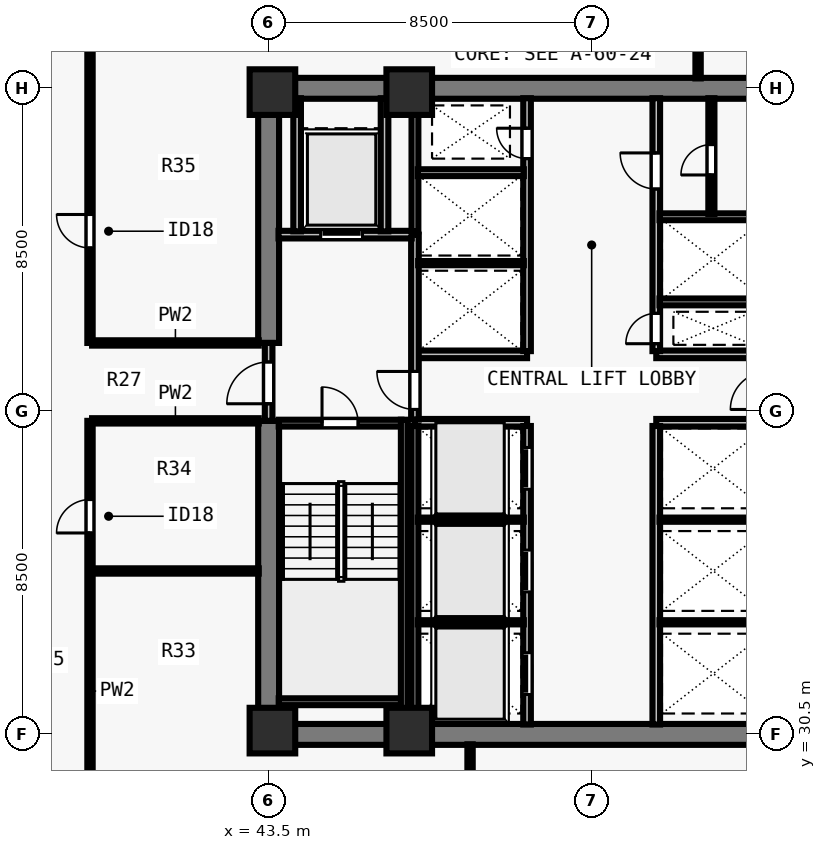
"""IFC4 building model, lengths in metres.
Left out: names, types, materials, properties, quantities, classifications, styles, units other than length and angle.
Written with IfcOpenShell. Run it as: python <this file> out.ifc"""

import sys

from ifc_helpers import new_model, si_unit, direction, frame, frame_2d, origin, origin_2d, place, context, subcontext, project, spatial, rectangle, extrude, element, fill, save


model = new_model("IFC4")
c1 = context("Model", 3, precision=1e-05, world=origin(), true_north=direction((0.0, 1.0)))
c2 = subcontext(c1, "Body", "Model", "MODEL_VIEW")
j1 = project(units=[si_unit("LENGTHUNIT", "METRE"), si_unit("PLANEANGLEUNIT", "RADIAN")], contexts=[c1])
p1 = place(None, origin())
s1 = spatial("IfcSite", under=j1, at=p1, CompositionType="ELEMENT")
p2 = place(p1, origin())
s2 = spatial("IfcBuilding", under=s1, at=p2, CompositionType="ELEMENT")
p3 = place(p2, frame((0.0, 0.0, 79.5)))
s3 = spatial("IfcBuildingStorey", under=s2, at=p3, CompositionType="ELEMENT", Elevation=79.5)
for number, where, z_axis, x_axis in (
    (1, (43.6, 30.6, 0.0), (0.0, 0.0, 1.0), (1.0, 0.0, 0.0)),
    (2, (47.2, 30.6, 0.0), (0.0, 0.0, 1.0), (1.0, 0.0, 0.0)),
    (3, (43.6, 47.4, 0.0), (0.0, 0.0, 1.0), (1.0, 0.0, 0.0)),
    (4, (47.2, 47.4, 0.0), (0.0, 0.0, 1.0), (1.0, 0.0, 0.0)),
):
    element("IfcColumn", number, at=place(p3, frame(where, z_axis=z_axis, x_axis=x_axis)), inside=s3, PredefinedType="COLUMN", context=c2, shape_type="SweptSolid", body=[
        extrude(rectangle(XDim=1.2, YDim=1.2, at=origin_2d()), origin(), (0.0, 0.0, 1.0), 3.5),
    ])
for number, where, z_axis, x_axis in (
    (5, (43.225, 30.5, 0.0), (0.0, 0.0, 1.0), (1.0, 0.0, 0.0)),
    (6, (43.225, 47.5, 0.0), (0.0, 0.0, 1.0), (1.0, 0.0, 0.0)),
):
    element("IfcWall", number, at=place(p3, frame(where, z_axis=z_axis, x_axis=x_axis)), inside=s3, PredefinedType="SHEAR", context=c2, shape_type="SweptSolid", body=[
        extrude(rectangle(XDim=17.55, YDim=0.55, at=frame_2d((8.775, 0.0))), origin(), (0.0, 0.0, 1.0), 3.28),
    ])
p4 = place(p3, frame((43.5, 30.765, 0.0), z_axis=(0.0, 0.0, 1.0), x_axis=(0.0, 1.0, 0.0)))
e7 = element("IfcWall", 7, at=p4, inside=s3, PredefinedType="SHEAR", context=c2, shape_type="SweptSolid", body=[
    extrude(rectangle(XDim=7.985, YDim=0.55, at=frame_2d((3.993, 0.0))), origin(), (0.0, 0.0, 1.0), 3.28),
])
p5 = place(p3, frame((43.5, 40.8, 0.0), z_axis=(0.0, 0.0, 1.0), x_axis=(0.0, 1.0, 0.0)))
e8 = element("IfcWall", 8, at=p5, inside=s3, PredefinedType="SHEAR", context=c2, shape_type="SweptSolid", body=[
    extrude(rectangle(XDim=6.435, YDim=0.55, at=frame_2d((3.218, 0.0))), origin(), (0.0, 0.0, 1.0), 3.28),
])
for number, where, z_axis, x_axis in (
    (9, (47.35, 38.7, 0.0), (0.0, 0.0, 1.0), (1.0, 0.0, 0.0)),
    (10, (47.35, 40.5, 0.0), (0.0, 0.0, 1.0), (1.0, 0.0, 0.0)),
    (11, (53.7, 38.7, 0.0), (0.0, 0.0, 1.0), (1.0, 0.0, 0.0)),
    (12, (53.7, 40.5, 0.0), (0.0, 0.0, 1.0), (1.0, 0.0, 0.0)),
):
    element("IfcWall", number, at=place(p3, frame(where, z_axis=z_axis, x_axis=x_axis)), inside=s3, PredefinedType="SOLIDWALL", context=c2, shape_type="SweptSolid", body=[
        extrude(rectangle(XDim=2.95, YDim=0.2, at=frame_2d((1.475, 0.0))), origin(), (0.0, 0.0, 1.0), 3.28),
    ])
p6 = place(p3, frame((50.3, 30.76, 0.0), z_axis=(0.0, 0.0, 1.0), x_axis=(0.0, 1.0, 0.0)))
e13 = element("IfcWall", 13, at=p6, inside=s3, PredefinedType="SOLIDWALL", context=c2, shape_type="SweptSolid", body=[
    extrude(rectangle(XDim=7.855, YDim=0.2, at=frame_2d((3.927, 0.0))), origin(), (0.0, 0.0, 1.0), 3.28),
])
p7 = place(p6, frame((0.79, 0.0, 0.0)))
e14 = element("IfcOpeningElement", 14, at=p7, cuts=e13, PredefinedType="OPENING", context=c2, shape_type="SweptSolid", body=[
    extrude(rectangle(XDim=1.1, YDim=2.2, at=frame_2d((0.55, 1.1))), frame((0.0, 0.11, 0.0), z_axis=(0.0, -1.0, 0.0), x_axis=(1.0, 0.0, 0.0)), (0.0, 0.0, 1.0), 0.22),
])
p8 = place(p6, frame((3.49, 0.0, 0.0)))
e15 = element("IfcOpeningElement", 15, at=p8, cuts=e13, PredefinedType="OPENING", context=c2, shape_type="SweptSolid", body=[
    extrude(rectangle(XDim=1.1, YDim=2.2, at=frame_2d((0.55, 1.1))), frame((0.0, 0.11, 0.0), z_axis=(0.0, -1.0, 0.0), x_axis=(1.0, 0.0, 0.0)), (0.0, 0.0, 1.0), 0.22),
])
p9 = place(p6, frame((6.19, 0.0, 0.0)))
e16 = element("IfcOpeningElement", 16, at=p9, cuts=e13, PredefinedType="OPENING", context=c2, shape_type="SweptSolid", body=[
    extrude(rectangle(XDim=1.1, YDim=2.2, at=frame_2d((0.55, 1.1))), frame((0.0, 0.11, 0.0), z_axis=(0.0, -1.0, 0.0), x_axis=(1.0, 0.0, 0.0)), (0.0, 0.0, 1.0), 0.22),
])
p10 = place(p3, frame((53.7, 30.76, 0.0), z_axis=(0.0, 0.0, 1.0), x_axis=(0.0, 1.0, 0.0)))
e17 = element("IfcWall", 17, at=p10, inside=s3, PredefinedType="SOLIDWALL", context=c2, shape_type="SweptSolid", body=[
    extrude(rectangle(XDim=7.855, YDim=0.2, at=frame_2d((3.927, 0.0))), origin(), (0.0, 0.0, 1.0), 3.28),
])
p11 = place(p3, frame((50.3, 40.585, 0.0), z_axis=(0.0, 0.0, 1.0), x_axis=(0.0, 1.0, 0.0)))
e18 = element("IfcWall", 18, at=p11, inside=s3, PredefinedType="SOLIDWALL", context=c2, shape_type="SweptSolid", body=[
    extrude(rectangle(XDim=6.655, YDim=0.2, at=frame_2d((3.328, 0.0))), origin(), (0.0, 0.0, 1.0), 3.28),
])
p12 = place(p11, frame((5.065, 0.0, 0.0)))
e19 = element("IfcOpeningElement", 19, at=p12, cuts=e18, PredefinedType="OPENING", context=c2, shape_type="SweptSolid", body=[
    extrude(rectangle(XDim=0.8, YDim=2.08, at=frame_2d((0.4, 1.04))), frame((0.0, 0.11, 0.0), z_axis=(0.0, -1.0, 0.0), x_axis=(1.0, 0.0, 0.0)), (0.0, 0.0, 1.0), 0.22),
])
p13 = place(p3, frame((53.7, 40.585, 0.0), z_axis=(0.0, 0.0, 1.0), x_axis=(0.0, 1.0, 0.0)))
e20 = element("IfcWall", 20, at=p13, inside=s3, PredefinedType="SOLIDWALL", context=c2, shape_type="SweptSolid", body=[
    extrude(rectangle(XDim=6.655, YDim=0.2, at=frame_2d((3.328, 0.0))), origin(), (0.0, 0.0, 1.0), 3.28),
])
p14 = place(p13, frame((0.195, 0.0, 0.0)))
e21 = element("IfcOpeningElement", 21, at=p14, cuts=e20, PredefinedType="OPENING", context=c2, shape_type="SweptSolid", body=[
    extrude(rectangle(XDim=0.8, YDim=2.08, at=frame_2d((0.4, 1.04))), frame((0.0, 0.11, 0.0), z_axis=(0.0, -1.0, 0.0), x_axis=(1.0, 0.0, 0.0)), (0.0, 0.0, 1.0), 0.22),
])
p15 = place(p13, frame((4.265, 0.0, 0.0)))
e22 = element("IfcOpeningElement", 22, at=p15, cuts=e20, PredefinedType="OPENING", context=c2, shape_type="SweptSolid", body=[
    extrude(rectangle(XDim=0.95, YDim=2.12, at=frame_2d((0.475, 1.06))), frame((0.0, 0.11, 0.0), z_axis=(0.0, -1.0, 0.0), x_axis=(1.0, 0.0, 0.0)), (0.0, 0.0, 1.0), 0.22),
])
p16 = place(p3, frame((43.5, 38.75, 0.0), z_axis=(0.0, 0.0, 1.0), x_axis=(0.0, 1.0, 0.0)))
e23 = element("IfcWall", 23, at=p16, inside=s3, PredefinedType="SOLIDWALL", context=c2, shape_type="SweptSolid", body=[
    extrude(rectangle(XDim=2.05, YDim=0.2, at=frame_2d((1.025, 0.0))), origin(), (0.0, 0.0, 1.0), 3.28),
])
p17 = place(p16, frame((0.45, 0.0, 0.0)))
e24 = element("IfcOpeningElement", 24, at=p17, cuts=e23, PredefinedType="OPENING", context=c2, shape_type="SweptSolid", body=[
    extrude(rectangle(XDim=1.1, YDim=2.15, at=frame_2d((0.55, 1.075))), frame((0.0, 0.11, 0.0), z_axis=(0.0, -1.0, 0.0), x_axis=(1.0, 0.0, 0.0)), (0.0, 0.0, 1.0), 0.22),
])
p18 = place(p3, frame((47.35, 38.785, 0.0), z_axis=(0.0, 0.0, 1.0), x_axis=(0.0, 1.0, 0.0)))
e25 = element("IfcWall", 25, at=p18, inside=s3, PredefinedType="SOLIDWALL", context=c2, shape_type="SweptSolid", body=[
    extrude(rectangle(XDim=4.865, YDim=0.2, at=frame_2d((2.433, 0.0))), origin(), (0.0, 0.0, 1.0), 3.28),
])
p19 = place(p18, frame((0.265, 0.0, 0.0)))
e26 = element("IfcOpeningElement", 26, at=p19, cuts=e25, PredefinedType="OPENING", context=c2, shape_type="SweptSolid", body=[
    extrude(rectangle(XDim=1.0, YDim=2.15, at=frame_2d((0.5, 1.075))), frame((0.0, 0.11, 0.0), z_axis=(0.0, -1.0, 0.0), x_axis=(1.0, 0.0, 0.0)), (0.0, 0.0, 1.0), 0.22),
])
p20 = place(p3, frame((43.76, 43.65, 0.0), z_axis=(0.0, 0.0, 1.0), x_axis=(1.0, 0.0, 0.0)))
e27 = element("IfcWall", 27, at=p20, inside=s3, PredefinedType="SOLIDWALL", context=c2, shape_type="SweptSolid", body=[
    extrude(rectangle(XDim=3.505, YDim=0.2, at=frame_2d((1.752, 0.0))), origin(), (0.0, 0.0, 1.0), 3.28),
])
p21 = place(p20, frame((1.11, 0.0, 0.0)))
e28 = element("IfcOpeningElement", 28, at=p21, cuts=e27, PredefinedType="OPENING", context=c2, shape_type="SweptSolid", body=[
    extrude(rectangle(XDim=1.1, YDim=2.2, at=frame_2d((0.55, 1.1))), frame((0.0, 0.11, 0.0), z_axis=(0.0, -1.0, 0.0), x_axis=(1.0, 0.0, 0.0)), (0.0, 0.0, 1.0), 0.22),
])
for number, where, z_axis, x_axis in (
    (29, (46.55, 43.735, 0.0), (0.0, 0.0, 1.0), (0.0, 1.0, 0.0)),
    (30, (44.25, 43.735, 0.0), (0.0, 0.0, 1.0), (0.0, 1.0, 0.0)),
):
    element("IfcWall", number, at=place(p3, frame(where, z_axis=z_axis, x_axis=x_axis)), inside=s3, PredefinedType="SOLIDWALL", context=c2, shape_type="SweptSolid", body=[
        extrude(rectangle(XDim=3.505, YDim=0.2, at=frame_2d((1.752, 0.0))), origin(), (0.0, 0.0, 1.0), 3.28),
    ])
p22 = place(p3, frame((47.35, 30.76, 0.0), z_axis=(0.0, 0.0, 1.0), x_axis=(0.0, 1.0, 0.0)))
e31 = element("IfcWall", 31, at=p22, inside=s3, PredefinedType="SOLIDWALL", context=c2, shape_type="SweptSolid", body=[
    extrude(rectangle(XDim=7.855, YDim=0.18, at=frame_2d((3.927, 0.0))), origin(), (0.0, 0.0, 1.0), 3.28),
])
for number, where, z_axis, x_axis in (
    (32, (47.425, 33.45, 0.0), (0.0, 0.0, 1.0), (1.0, 0.0, 0.0)),
    (33, (47.425, 36.15, 0.0), (0.0, 0.0, 1.0), (1.0, 0.0, 0.0)),
    (34, (53.785, 33.45, 0.0), (0.0, 0.0, 1.0), (1.0, 0.0, 0.0)),
    (35, (53.785, 36.15, 0.0), (0.0, 0.0, 1.0), (1.0, 0.0, 0.0)),
):
    element("IfcWall", number, at=place(p3, frame(where, z_axis=z_axis, x_axis=x_axis)), inside=s3, PredefinedType="PARTITIONING", context=c2, shape_type="SweptSolid", body=[
        extrude(rectangle(XDim=2.79, YDim=0.11, at=frame_2d((1.395, 0.0))), origin(), (0.0, 0.0, 1.0), 3.28),
    ])
p23 = place(p3, frame((47.35, 43.735, 0.0), z_axis=(0.0, 0.0, 1.0), x_axis=(0.0, 1.0, 0.0)))
e36 = element("IfcWall", 36, at=p23, inside=s3, PredefinedType="SOLIDWALL", context=c2, shape_type="SweptSolid", body=[
    extrude(rectangle(XDim=3.505, YDim=0.18, at=frame_2d((1.752, 0.0))), origin(), (0.0, 0.0, 1.0), 3.28),
])
p24 = place(p3, frame((47.435, 42.9, 0.0), z_axis=(0.0, 0.0, 1.0), x_axis=(1.0, 0.0, 0.0)))
e37 = element("IfcWall", 37, at=p24, inside=s3, PredefinedType="PARTITIONING", context=c2, shape_type="SweptSolid", body=[
    extrude(rectangle(XDim=2.78, YDim=0.11, at=frame_2d((1.39, 0.0))), origin(), (0.0, 0.0, 1.0), 3.28),
])
p25 = place(p3, frame((47.425, 45.28, 0.0), z_axis=(0.0, 0.0, 1.0), x_axis=(1.0, 0.0, 0.0)))
e38 = element("IfcWall", 38, at=p25, inside=s3, PredefinedType="SOLIDWALL", context=c2, shape_type="SweptSolid", body=[
    extrude(rectangle(XDim=2.79, YDim=0.18, at=frame_2d((1.395, 0.0))), origin(), (0.0, 0.0, 1.0), 3.28),
])
p26 = place(p3, frame((53.785, 41.88, 0.0), z_axis=(0.0, 0.0, 1.0), x_axis=(1.0, 0.0, 0.0)))
e39 = element("IfcWall", 39, at=p26, inside=s3, PredefinedType="SOLIDWALL", context=c2, shape_type="SweptSolid", body=[
    extrude(rectangle(XDim=2.78, YDim=0.18, at=frame_2d((1.39, 0.0))), origin(), (0.0, 0.0, 1.0), 3.28),
])
p27 = place(p3, frame((53.785, 44.12, 0.0), z_axis=(0.0, 0.0, 1.0), x_axis=(1.0, 0.0, 0.0)))
e40 = element("IfcWall", 40, at=p27, inside=s3, PredefinedType="SOLIDWALL", context=c2, shape_type="SweptSolid", body=[
    extrude(rectangle(XDim=2.79, YDim=0.18, at=frame_2d((1.395, 0.0))), origin(), (0.0, 0.0, 1.0), 3.28),
])
p28 = place(p3, frame((55.15, 44.195, 0.0), z_axis=(0.0, 0.0, 1.0), x_axis=(0.0, 1.0, 0.0)))
e41 = element("IfcWall", 41, at=p28, inside=s3, PredefinedType="PARTITIONING", context=c2, shape_type="SweptSolid", body=[
    extrude(rectangle(XDim=3.045, YDim=0.16, at=frame_2d((1.522, 0.0))), origin(), (0.0, 0.0, 1.0), 3.28),
])
p29 = place(p28, frame((1.025, 0.0, 0.0)))
e42 = element("IfcOpeningElement", 42, at=p29, cuts=e41, PredefinedType="OPENING", context=c2, shape_type="SweptSolid", body=[
    extrude(rectangle(XDim=0.8, YDim=2.1, at=frame_2d((0.4, 1.05))), frame((0.0, 0.09, 0.0), z_axis=(0.0, -1.0, 0.0), x_axis=(1.0, 0.0, 0.0)), (0.0, 0.0, 1.0), 0.18),
])
p30 = place(p3, frame((38.8, 25.555, 0.0), z_axis=(0.0, 0.0, 1.0), x_axis=(0.0, 1.0, 0.0)))
e43 = element("IfcWall", 43, at=p30, inside=s3, PredefinedType="PARTITIONING", context=c2, shape_type="SweptSolid", body=[
    extrude(rectangle(XDim=13.195, YDim=0.14, at=frame_2d((6.598, 0.0))), origin(), (0.0, 0.0, 1.0), 3.28),
])
p31 = place(p30, frame((1.045, 0.0, 0.0)))
e44 = element("IfcOpeningElement", 44, at=p31, cuts=e43, PredefinedType="OPENING", context=c2, shape_type="SweptSolid", body=[
    extrude(rectangle(XDim=0.88, YDim=2.1, at=frame_2d((0.44, 1.05))), frame((0.0, 0.08, 0.0), z_axis=(0.0, -1.0, 0.0), x_axis=(1.0, 0.0, 0.0)), (0.0, 0.0, 1.0), 0.16),
])
p32 = place(p30, frame((10.245, 0.0, 0.0)))
e45 = element("IfcOpeningElement", 45, at=p32, cuts=e43, PredefinedType="OPENING", context=c2, shape_type="SweptSolid", body=[
    extrude(rectangle(XDim=0.88, YDim=2.1, at=frame_2d((0.44, 1.05))), frame((0.0, 0.08, 0.0), z_axis=(0.0, -1.0, 0.0), x_axis=(1.0, 0.0, 0.0)), (0.0, 0.0, 1.0), 0.16),
])
p33 = place(p3, frame((38.8, 40.8, 0.0), z_axis=(0.0, 0.0, 1.0), x_axis=(0.0, 1.0, 0.0)))
e46 = element("IfcWall", 46, at=p33, inside=s3, PredefinedType="PARTITIONING", context=c2, shape_type="SweptSolid", body=[
    extrude(rectangle(XDim=11.645, YDim=0.14, at=frame_2d((5.823, 0.0))), origin(), (0.0, 0.0, 1.0), 3.28),
])
p34 = place(p33, frame((2.5, 0.0, 0.0)))
e47 = element("IfcOpeningElement", 47, at=p34, cuts=e46, PredefinedType="OPENING", context=c2, shape_type="SweptSolid", body=[
    extrude(rectangle(XDim=0.88, YDim=2.1, at=frame_2d((0.44, 1.05))), frame((0.0, 0.08, 0.0), z_axis=(0.0, -1.0, 0.0), x_axis=(1.0, 0.0, 0.0)), (0.0, 0.0, 1.0), 0.16),
])
for number, where, z_axis, x_axis in (
    (48, (38.855, 38.75, 0.0), (0.0, 0.0, 1.0), (1.0, 0.0, 0.0)),
    (49, (38.855, 40.8, 0.0), (0.0, 0.0, 1.0), (1.0, 0.0, 0.0)),
):
    element("IfcWall", number, at=place(p3, frame(where, z_axis=z_axis, x_axis=x_axis)), inside=s3, PredefinedType="PARTITIONING", context=c2, shape_type="SweptSolid", body=[
        extrude(rectangle(XDim=4.385, YDim=0.14, at=frame_2d((2.192, 0.0))), origin(), (0.0, 0.0, 1.0), 3.28),
    ])
for number, where, z_axis, x_axis in (
    (50, (48.8, 25.555, 0.0), (0.0, 0.0, 1.0), (0.0, 1.0, 0.0)),
    (51, (54.8, 47.76, 0.0), (0.0, 0.0, 1.0), (0.0, 1.0, 0.0)),
):
    element("IfcWall", number, at=place(p3, frame(where, z_axis=z_axis, x_axis=x_axis)), inside=s3, PredefinedType="PARTITIONING", context=c2, shape_type="SweptSolid", body=[
        extrude(rectangle(XDim=4.685, YDim=0.14, at=frame_2d((2.343, 0.0))), origin(), (0.0, 0.0, 1.0), 3.28),
    ])
p35 = place(p3, frame((38.855, 34.8, 0.0), z_axis=(0.0, 0.0, 1.0), x_axis=(1.0, 0.0, 0.0)))
e52 = element("IfcWall", 52, at=p35, inside=s3, PredefinedType="PARTITIONING", context=c2, shape_type="SweptSolid", body=[
    extrude(rectangle(XDim=4.385, YDim=0.14, at=frame_2d((2.192, 0.0))), origin(), (0.0, 0.0, 1.0), 3.28),
])
p36 = place(p3, frame((43.765, 38.69, 0.0), z_axis=(0.0, 0.0, 1.0), x_axis=(1.0, 0.0, 0.0)))
e53 = element("IfcWall", 53, at=p36, inside=s3, PredefinedType="SOLIDWALL", context=c2, shape_type="SweptSolid", body=[
    extrude(rectangle(XDim=3.23, YDim=0.18, at=frame_2d((1.615, 0.0))), origin(), (0.0, 0.0, 1.0), 3.28),
])
p37 = place(p36, frame((1.14, 0.0, 0.0)))
e54 = element("IfcOpeningElement", 54, at=p37, cuts=e53, PredefinedType="OPENING", context=c2, shape_type="SweptSolid", body=[
    extrude(rectangle(XDim=0.95, YDim=2.15, at=frame_2d((0.475, 1.075))), frame((0.0, 0.1, 0.0), z_axis=(0.0, -1.0, 0.0), x_axis=(1.0, 0.0, 0.0)), (0.0, 0.0, 1.0), 0.2),
])
p38 = place(p3, frame((43.765, 31.36, 0.0), z_axis=(0.0, 0.0, 1.0), x_axis=(1.0, 0.0, 0.0)))
e55 = element("IfcWall", 55, at=p38, inside=s3, PredefinedType="SOLIDWALL", context=c2, shape_type="SweptSolid", body=[
    extrude(rectangle(XDim=3.23, YDim=0.18, at=frame_2d((1.615, 0.0))), origin(), (0.0, 0.0, 1.0), 3.28),
])
p39 = place(p3, frame((47.07, 38.78, 0.0), z_axis=(0.0, 0.0, 1.0), x_axis=(0.0, -1.0, 0.0)))
e56 = element("IfcWall", 56, at=p39, inside=s3, PredefinedType="SOLIDWALL", context=c2, shape_type="SweptSolid", body=[
    extrude(rectangle(XDim=8.017, YDim=0.18, at=frame_2d((4.009, 0.0))), origin(), (0.0, 0.0, 1.0), 3.28),
])
p40 = place(p17, origin())
e57 = element("IfcDoor", 57, at=p40, inside=s3, OperationType="SINGLE_SWING_LEFT", PredefinedType="DOOR", context=c2, shape_type="SweptSolid", body=[
    extrude(rectangle(XDim=1.1, YDim=2.15, at=frame_2d((0.55, 1.075))), frame((0.0, 0.025, 0.0), z_axis=(0.0, -1.0, 0.0), x_axis=(1.0, 0.0, 0.0)), (0.0, 0.0, 1.0), 0.05),
])
fill(e24, e57)
p41 = place(p19, origin())
e58 = element("IfcDoor", 58, at=p41, inside=s3, OperationType="SINGLE_SWING_RIGHT", PredefinedType="DOOR", context=c2, shape_type="SweptSolid", body=[
    extrude(rectangle(XDim=1.0, YDim=2.15, at=frame_2d((0.5, 1.075))), frame((0.0, 0.025, 0.0), z_axis=(0.0, -1.0, 0.0), x_axis=(1.0, 0.0, 0.0)), (0.0, 0.0, 1.0), 0.05),
])
fill(e26, e58)
p42 = place(p21, origin())
e59 = element("IfcDoor", 59, at=p42, inside=s3, OperationType="SLIDING_TO_LEFT", PredefinedType="DOOR", context=c2, shape_type="SweptSolid", body=[
    extrude(rectangle(XDim=1.1, YDim=2.2, at=frame_2d((0.55, 1.1))), frame((0.0, 0.025, 0.0), z_axis=(0.0, -1.0, 0.0), x_axis=(1.0, 0.0, 0.0)), (0.0, 0.0, 1.0), 0.05),
])
fill(e28, e59)
p43 = place(p7, origin())
e60 = element("IfcDoor", 60, at=p43, inside=s3, OperationType="SLIDING_TO_LEFT", PredefinedType="DOOR", context=c2, shape_type="SweptSolid", body=[
    extrude(rectangle(XDim=1.1, YDim=2.2, at=frame_2d((0.55, 1.1))), frame((0.0, 0.025, 0.0), z_axis=(0.0, -1.0, 0.0), x_axis=(1.0, 0.0, 0.0)), (0.0, 0.0, 1.0), 0.05),
])
fill(e14, e60)
p44 = place(p8, origin())
e61 = element("IfcDoor", 61, at=p44, inside=s3, OperationType="SLIDING_TO_LEFT", PredefinedType="DOOR", context=c2, shape_type="SweptSolid", body=[
    extrude(rectangle(XDim=1.1, YDim=2.2, at=frame_2d((0.55, 1.1))), frame((0.0, 0.025, 0.0), z_axis=(0.0, -1.0, 0.0), x_axis=(1.0, 0.0, 0.0)), (0.0, 0.0, 1.0), 0.05),
])
fill(e15, e61)
p45 = place(p9, origin())
e62 = element("IfcDoor", 62, at=p45, inside=s3, OperationType="SLIDING_TO_LEFT", PredefinedType="DOOR", context=c2, shape_type="SweptSolid", body=[
    extrude(rectangle(XDim=1.1, YDim=2.2, at=frame_2d((0.55, 1.1))), frame((0.0, 0.025, 0.0), z_axis=(0.0, -1.0, 0.0), x_axis=(1.0, 0.0, 0.0)), (0.0, 0.0, 1.0), 0.05),
])
fill(e16, e62)
p46 = place(p12, origin())
e63 = element("IfcDoor", 63, at=p46, inside=s3, OperationType="SINGLE_SWING_RIGHT", PredefinedType="DOOR", context=c2, shape_type="SweptSolid", body=[
    extrude(rectangle(XDim=0.8, YDim=2.08, at=frame_2d((0.4, 1.04))), frame((0.0, 0.025, 0.0), z_axis=(0.0, -1.0, 0.0), x_axis=(1.0, 0.0, 0.0)), (0.0, 0.0, 1.0), 0.05),
])
fill(e19, e63)
p47 = place(p14, origin())
e64 = element("IfcDoor", 64, at=p47, inside=s3, OperationType="SINGLE_SWING_LEFT", PredefinedType="DOOR", context=c2, shape_type="SweptSolid", body=[
    extrude(rectangle(XDim=0.8, YDim=2.08, at=frame_2d((0.4, 1.04))), frame((0.0, 0.025, 0.0), z_axis=(0.0, -1.0, 0.0), x_axis=(1.0, 0.0, 0.0)), (0.0, 0.0, 1.0), 0.05),
])
fill(e21, e64)
p48 = place(p15, origin())
e65 = element("IfcDoor", 65, at=p48, inside=s3, OperationType="SINGLE_SWING_RIGHT", PredefinedType="DOOR", context=c2, shape_type="SweptSolid", body=[
    extrude(rectangle(XDim=0.95, YDim=2.12, at=frame_2d((0.475, 1.06))), frame((0.0, 0.025, 0.0), z_axis=(0.0, -1.0, 0.0), x_axis=(1.0, 0.0, 0.0)), (0.0, 0.0, 1.0), 0.05),
])
fill(e22, e65)
p49 = place(p29, origin())
e66 = element("IfcDoor", 66, at=p49, inside=s3, OperationType="SINGLE_SWING_LEFT", PredefinedType="DOOR", context=c2, shape_type="SweptSolid", body=[
    extrude(rectangle(XDim=0.8, YDim=2.1, at=frame_2d((0.4, 1.05))), frame((0.0, 0.025, 0.0), z_axis=(0.0, -1.0, 0.0), x_axis=(1.0, 0.0, 0.0)), (0.0, 0.0, 1.0), 0.05),
])
fill(e42, e66)
p50 = place(p32, origin())
e67 = element("IfcDoor", 67, at=p50, inside=s3, OperationType="SINGLE_SWING_LEFT", PredefinedType="DOOR", context=c2, shape_type="SweptSolid", body=[
    extrude(rectangle(XDim=0.88, YDim=2.1, at=frame_2d((0.44, 1.05))), frame((0.0, 0.025, 0.0), z_axis=(0.0, -1.0, 0.0), x_axis=(1.0, 0.0, 0.0)), (0.0, 0.0, 1.0), 0.05),
])
fill(e45, e67)
p51 = place(p34, origin())
e68 = element("IfcDoor", 68, at=p51, inside=s3, OperationType="SINGLE_SWING_RIGHT", PredefinedType="DOOR", context=c2, shape_type="SweptSolid", body=[
    extrude(rectangle(XDim=0.88, YDim=2.1, at=frame_2d((0.44, 1.05))), frame((0.0, 0.025, 0.0), z_axis=(0.0, -1.0, 0.0), x_axis=(1.0, 0.0, 0.0)), (0.0, 0.0, 1.0), 0.05),
])
fill(e47, e68)
p52 = place(p37, origin())
e69 = element("IfcDoor", 69, at=p52, inside=s3, OperationType="SINGLE_SWING_LEFT", PredefinedType="DOOR", context=c2, shape_type="SweptSolid", body=[
    extrude(rectangle(XDim=0.95, YDim=2.15, at=frame_2d((0.475, 1.075))), frame((0.0, 0.025, 0.0), z_axis=(0.0, -1.0, 0.0), x_axis=(1.0, 0.0, 0.0)), (0.0, 0.0, 1.0), 0.05),
])
fill(e54, e69)
save(model, sys.argv[1])
